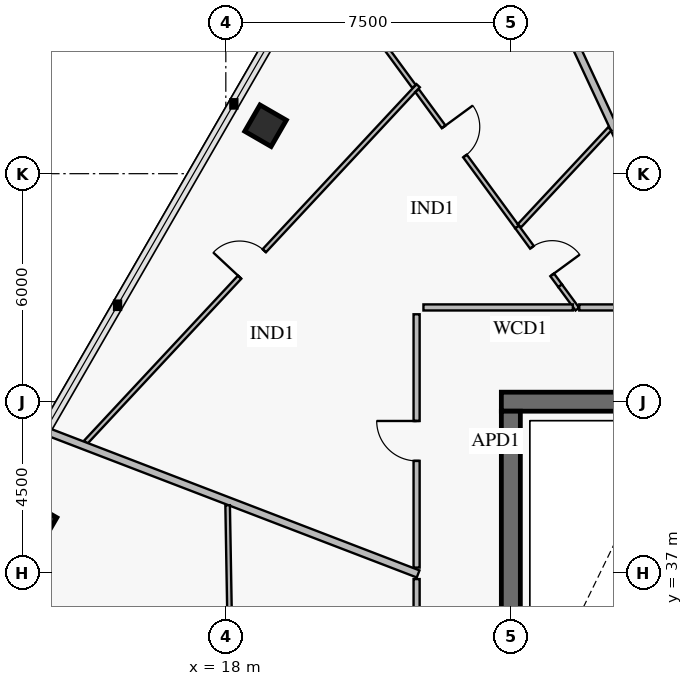
"""IFC4 building model, lengths in metres.
Left out: names, types, materials, properties, quantities, classifications, styles, units other than length and angle.
Written with IfcOpenShell. Run it as: python <this file> out.ifc"""

import sys

from ifc_helpers import new_model, si_unit, direction, frame, frame_2d, origin, origin_2d, place, context, subcontext, project, spatial, rectangle, extrude, element, fill, save


model = new_model("IFC4")
c1 = context("Model", 3, precision=1e-05, world=origin(), true_north=direction((0.0, 1.0)))
c2 = subcontext(c1, "Body", "Model", "MODEL_VIEW")
j1 = project(units=[si_unit("LENGTHUNIT", "METRE"), si_unit("PLANEANGLEUNIT", "RADIAN")], contexts=[c1])
p1 = place(None, origin())
s1 = spatial("IfcSite", under=j1, at=p1, CompositionType="ELEMENT")
p2 = place(p1, origin())
s2 = spatial("IfcBuilding", under=s1, at=p2, CompositionType="ELEMENT")
p3 = place(p2, frame((0.0, 0.0, 319.6)))
s3 = spatial("IfcBuildingStorey", under=s2, at=p3, CompositionType="ELEMENT", Elevation=319.6)
p4 = place(p3, frame((36.75, 41.5, 0.0), z_axis=(0.0, 0.0, 1.0), x_axis=(-1.0, 0.0, 0.0)))
e1 = element("IfcWall", 1, at=p4, inside=s3, PredefinedType="SHEAR", context=c2, shape_type="SweptSolid", body=[
    extrude(rectangle(XDim=11.5, YDim=0.5, at=frame_2d((5.75, 0.0))), origin(), (0.0, 0.0, 1.0), 3.8),
])
p5 = place(p4, frame((4.25, 0.0, 0.0)))
e2 = element("IfcOpeningElement", 2, at=p5, cuts=e1, PredefinedType="OPENING", context=c2, shape_type="SweptSolid", body=[
    extrude(rectangle(XDim=1.1, YDim=2.15, at=frame_2d((0.55, 1.075))), frame((0.0, 0.262, 0.0), z_axis=(0.0, -1.0, 0.0), x_axis=(1.0, 0.0, 0.0)), (0.0, 0.0, 1.0), 0.524),
])
p6 = place(p3, frame((25.5, 22.75, 0.0), z_axis=(0.0, 0.0, 1.0), x_axis=(0.0, 1.0, 0.0)))
e3 = element("IfcWall", 3, at=p6, inside=s3, PredefinedType="SHEAR", context=c2, shape_type="SweptSolid", body=[
    extrude(rectangle(XDim=18.5, YDim=0.5, at=frame_2d((9.25, 0.0))), origin(), (0.0, 0.0, 1.0), 3.8),
])
p7 = place(p6, frame((9.0, 0.0, 0.0)))
e4 = element("IfcOpeningElement", 4, at=p7, cuts=e3, PredefinedType="OPENING", context=c2, shape_type="SweptSolid", body=[
    extrude(rectangle(XDim=1.1, YDim=2.15, at=frame_2d((0.55, 1.075))), frame((0.0, 0.262, 0.0), z_axis=(0.0, -1.0, 0.0), x_axis=(1.0, 0.0, 0.0)), (0.0, 0.0, 1.0), 0.524),
])
for number, where, z_axis, x_axis in (
    (5, (19.045, 48.762, 0.0), (0.0, 0.0, 1.0), (-0.5, -0.866, 0.0)),
    (6, (13.007, 38.302, 0.0), (0.0, 0.0, 1.0), (-0.5, -0.866, 0.0)),
):
    element("IfcColumn", number, at=place(p3, frame(where, z_axis=z_axis, x_axis=x_axis)), inside=s3, PredefinedType="COLUMN", context=c2, shape_type="SweptSolid", body=[
        extrude(rectangle(XDim=0.8, YDim=0.8, at=origin_2d()), origin(), (0.0, 0.0, 1.0), 3.55),
    ])
p8 = place(p3, frame((23.062, 49.815, 0.0), z_axis=(0.0, 0.0, 1.0), x_axis=(-0.681996709379, -0.731355240903, 0.0)))
e7 = element("IfcWall", 7, at=p8, inside=s3, PredefinedType="PARTITIONING", context=c2, shape_type="SweptSolid", body=[
    extrude(rectangle(XDim=12.826, YDim=0.12, at=frame_2d((6.413, 0.0))), origin(), (0.0, 0.0, 1.0), 2.97),
])
p9 = place(p8, frame((5.938, 0.0, 0.0)))
e8 = element("IfcOpeningElement", 8, at=p9, cuts=e7, PredefinedType="OPENING", context=c2, shape_type="SweptSolid", body=[
    extrude(rectangle(XDim=0.95, YDim=2.1, at=frame_2d((0.475, 1.05))), frame((0.0, 0.072, 0.0), z_axis=(0.0, -1.0, 0.0), x_axis=(1.0, 0.0, 0.0)), (0.0, 0.0, 1.0), 0.144),
])
p10 = place(p3, frame((26.798, 44.55, 0.0), z_axis=(0.0, 0.0, 1.0), x_axis=(-0.591341620245, 0.80642116054, 0.0)))
e9 = element("IfcWall", 9, at=p10, inside=s3, PredefinedType="PARTITIONING", context=c2, shape_type="SweptSolid", body=[
    extrude(rectangle(XDim=1.921, YDim=0.12, at=frame_2d((0.96, 0.0))), origin(), (0.0, 0.0, 1.0), 3.55),
])
p11 = place(p10, frame((0.357, 0.0, 0.0)))
e10 = element("IfcOpeningElement", 10, at=p11, cuts=e9, PredefinedType="OPENING", context=c2, shape_type="SweptSolid", body=[
    extrude(rectangle(XDim=0.9, YDim=2.1, at=frame_2d((0.45, 1.05))), frame((0.0, 0.072, 0.0), z_axis=(0.0, -1.0, 0.0), x_axis=(1.0, 0.0, 0.0)), (0.0, 0.0, 1.0), 0.144),
])
p12 = place(p3, frame((25.662, 46.099, 0.0), z_axis=(0.0, 0.0, 1.0), x_axis=(-0.591311292855, 0.806443398474, 0.0)))
e11 = element("IfcWall", 11, at=p12, inside=s3, PredefinedType="PARTITIONING", context=c2, shape_type="SweptSolid", body=[
    extrude(rectangle(XDim=4.446, YDim=0.12, at=frame_2d((2.223, 0.0))), origin(), (0.0, 0.0, 1.0), 3.55),
])
p13 = place(p12, frame((2.314, 0.0, 0.0)))
e12 = element("IfcOpeningElement", 12, at=p13, cuts=e11, PredefinedType="OPENING", context=c2, shape_type="SweptSolid", body=[
    extrude(rectangle(XDim=0.95, YDim=2.1, at=frame_2d((0.475, 1.05))), frame((0.0, 0.072, 0.0), z_axis=(0.0, -1.0, 0.0), x_axis=(1.0, 0.0, 0.0)), (0.0, 0.0, 1.0), 0.144),
])
p14 = place(p3, frame((22.951, 49.796, 0.0), z_axis=(0.0, 0.0, 1.0), x_axis=(-0.591303744842, 0.806448932875, 0.0)))
e13 = element("IfcWall", 13, at=p14, inside=s3, PredefinedType="PARTITIONING", context=c2, shape_type="SweptSolid", body=[
    extrude(rectangle(XDim=4.24, YDim=0.12, at=frame_2d((2.12, 0.0))), origin(), (0.0, 0.0, 1.0), 2.97),
])
p15 = place(p3, frame((23.02, 43.8, 0.0), z_axis=(0.0, 0.0, 1.0), x_axis=(0.0, -1.0, 0.0)))
e14 = element("IfcWall", 14, at=p15, inside=s3, PredefinedType="PARTITIONING", context=c2, shape_type="SweptSolid", body=[
    extrude(rectangle(XDim=6.666, YDim=0.16, at=frame_2d((3.333, 0.0))), origin(), (0.0, 0.0, 1.0), 3.55),
])
p16 = place(p15, frame((2.808, 0.0, 0.0)))
e15 = element("IfcOpeningElement", 15, at=p16, cuts=e14, PredefinedType="OPENING", context=c2, shape_type="SweptSolid", body=[
    extrude(rectangle(XDim=1.05, YDim=2.15, at=frame_2d((0.525, 1.075))), frame((0.0, 0.092, 0.0), z_axis=(0.0, -1.0, 0.0), x_axis=(1.0, 0.0, 0.0)), (0.0, 0.0, 1.0), 0.184),
])
p17 = place(p3, frame((30.432, 43.94, 0.0), z_axis=(0.0, 0.0, 1.0), x_axis=(-0.422611922644, 0.906310742979, 0.0)))
e16 = element("IfcWall", 16, at=p17, inside=s3, PredefinedType="PARTITIONING", context=c2, shape_type="SweptSolid", body=[
    extrude(rectangle(XDim=13.389, YDim=0.2, at=frame_2d((6.694, 0.0))), origin(), (0.0, 0.0, 1.0), 2.97),
])
p18 = place(p3, frame((27.249, 43.935, 0.0), z_axis=(0.0, 0.0, 1.0), x_axis=(-0.591099878677, 0.806598371824, 0.0)))
e17 = element("IfcWall", 17, at=p18, inside=s3, PredefinedType="PARTITIONING", context=c2, shape_type="SweptSolid", body=[
    extrude(rectangle(XDim=0.762, YDim=0.12, at=frame_2d((0.381, 0.0))), origin(), (0.0, 0.0, 1.0), 3.55),
])
p19 = place(p3, frame((28.103, 48.68, 0.0), z_axis=(0.0, 0.0, 1.0), x_axis=(-0.681964001054, -0.731385740404, 0.0)))
e18 = element("IfcWall", 18, at=p19, inside=s3, PredefinedType="PARTITIONING", context=c2, shape_type="SweptSolid", body=[
    extrude(rectangle(XDim=3.488, YDim=0.12, at=frame_2d((1.744, 0.0))), origin(), (0.0, 0.0, 1.0), 3.55),
])
p20 = place(p3, frame((23.06, 36.967, 0.0), z_axis=(0.0, 0.0, 1.0), x_axis=(-0.933584200724, 0.358358117194, 0.0)))
e19 = element("IfcWall", 19, at=p20, inside=s3, PredefinedType="PARTITIONING", context=c2, shape_type="SweptSolid", body=[
    extrude(rectangle(XDim=10.513, YDim=0.2, at=frame_2d((5.257, 0.0))), origin(), (0.0, 0.0, 1.0), 2.97),
])
p21 = place(p3, frame((18.048, 38.776, 0.0), z_axis=(0.0, 0.0, 1.0), x_axis=(0.017410568339, -0.999848424567, 0.0)))
e20 = element("IfcWall", 20, at=p21, inside=s3, PredefinedType="PARTITIONING", context=c2, shape_type="SweptSolid", body=[
    extrude(rectangle(XDim=4.459, YDim=0.12, at=frame_2d((2.229, 0.0))), origin(), (0.0, 0.0, 1.0), 3.0),
])
p22 = place(p3, frame((27.132, 43.98, 0.0), z_axis=(0.0, 0.0, 1.0), x_axis=(-1.0, 0.0, 0.0)))
e21 = element("IfcWall", 21, at=p22, inside=s3, PredefinedType="PARTITIONING", context=c2, shape_type="SweptSolid", body=[
    extrude(rectangle(XDim=3.932, YDim=0.16, at=frame_2d((1.966, 0.0))), origin(), (0.0, 0.0, 1.0), 3.0),
])
p23 = place(p3, frame((30.264, 43.98, 0.0), z_axis=(0.0, 0.0, 1.0), x_axis=(-1.0, 0.0, 0.0)))
e22 = element("IfcWall", 22, at=p23, inside=s3, PredefinedType="PARTITIONING", context=c2, shape_type="SweptSolid", body=[
    extrude(rectangle(XDim=2.963, YDim=0.16, at=frame_2d((1.482, 0.0))), origin(), (0.0, 0.0, 1.0), 3.55),
])
p24 = place(p3, frame((23.02, 36.832, 0.0), z_axis=(0.0, 0.0, 1.0), x_axis=(0.0, -1.0, 0.0)))
e23 = element("IfcWall", 23, at=p24, inside=s3, PredefinedType="PARTITIONING", context=c2, shape_type="SweptSolid", body=[
    extrude(rectangle(XDim=3.13, YDim=0.16, at=frame_2d((1.565, 0.0))), origin(), (0.0, 0.0, 1.0), 3.0),
])
p25 = place(p9, frame((0.95, 0.0, 0.0), z_axis=(0.0, 0.0, 1.0), x_axis=(-1.0, 0.0, 0.0)))
e24 = element("IfcDoor", 24, at=p25, inside=s3, OperationType="SINGLE_SWING_LEFT", PredefinedType="DOOR", context=c2, shape_type="SweptSolid", body=[
    extrude(rectangle(XDim=0.95, YDim=2.1, at=frame_2d((0.475, 1.05))), frame((0.0, 0.025, 0.0), z_axis=(0.0, -1.0, 0.0), x_axis=(1.0, 0.0, 0.0)), (0.0, 0.0, 1.0), 0.05),
])
fill(e8, e24)
p26 = place(p11, frame((0.9, 0.0, 0.0), z_axis=(0.0, 0.0, 1.0), x_axis=(-1.0, 0.0, 0.0)))
e25 = element("IfcDoor", 25, at=p26, inside=s3, OperationType="SINGLE_SWING_RIGHT", PredefinedType="DOOR", context=c2, shape_type="SweptSolid", body=[
    extrude(rectangle(XDim=0.9, YDim=2.1, at=frame_2d((0.45, 1.05))), frame((0.0, 0.025, 0.0), z_axis=(0.0, -1.0, 0.0), x_axis=(1.0, 0.0, 0.0)), (0.0, 0.0, 1.0), 0.05),
])
fill(e10, e25)
p27 = place(p13, frame((0.95, 0.0, 0.0), z_axis=(0.0, 0.0, 1.0), x_axis=(-1.0, 0.0, 0.0)))
e26 = element("IfcDoor", 26, at=p27, inside=s3, OperationType="SINGLE_SWING_LEFT", PredefinedType="DOOR", context=c2, shape_type="SweptSolid", body=[
    extrude(rectangle(XDim=0.95, YDim=2.1, at=frame_2d((0.475, 1.05))), frame((0.0, 0.025, 0.0), z_axis=(0.0, -1.0, 0.0), x_axis=(1.0, 0.0, 0.0)), (0.0, 0.0, 1.0), 0.05),
])
fill(e12, e26)
p28 = place(p16, frame((1.05, 0.0, 0.0), z_axis=(0.0, 0.0, 1.0), x_axis=(-1.0, 0.0, 0.0)))
e27 = element("IfcDoor", 27, at=p28, inside=s3, OperationType="SINGLE_SWING_RIGHT", PredefinedType="DOOR", context=c2, shape_type="SweptSolid", body=[
    extrude(rectangle(XDim=1.05, YDim=2.15, at=frame_2d((0.525, 1.075))), frame((0.0, 0.025, 0.0), z_axis=(0.0, -1.0, 0.0), x_axis=(1.0, 0.0, 0.0)), (0.0, 0.0, 1.0), 0.05),
])
fill(e15, e27)
save(model, sys.argv[1])
